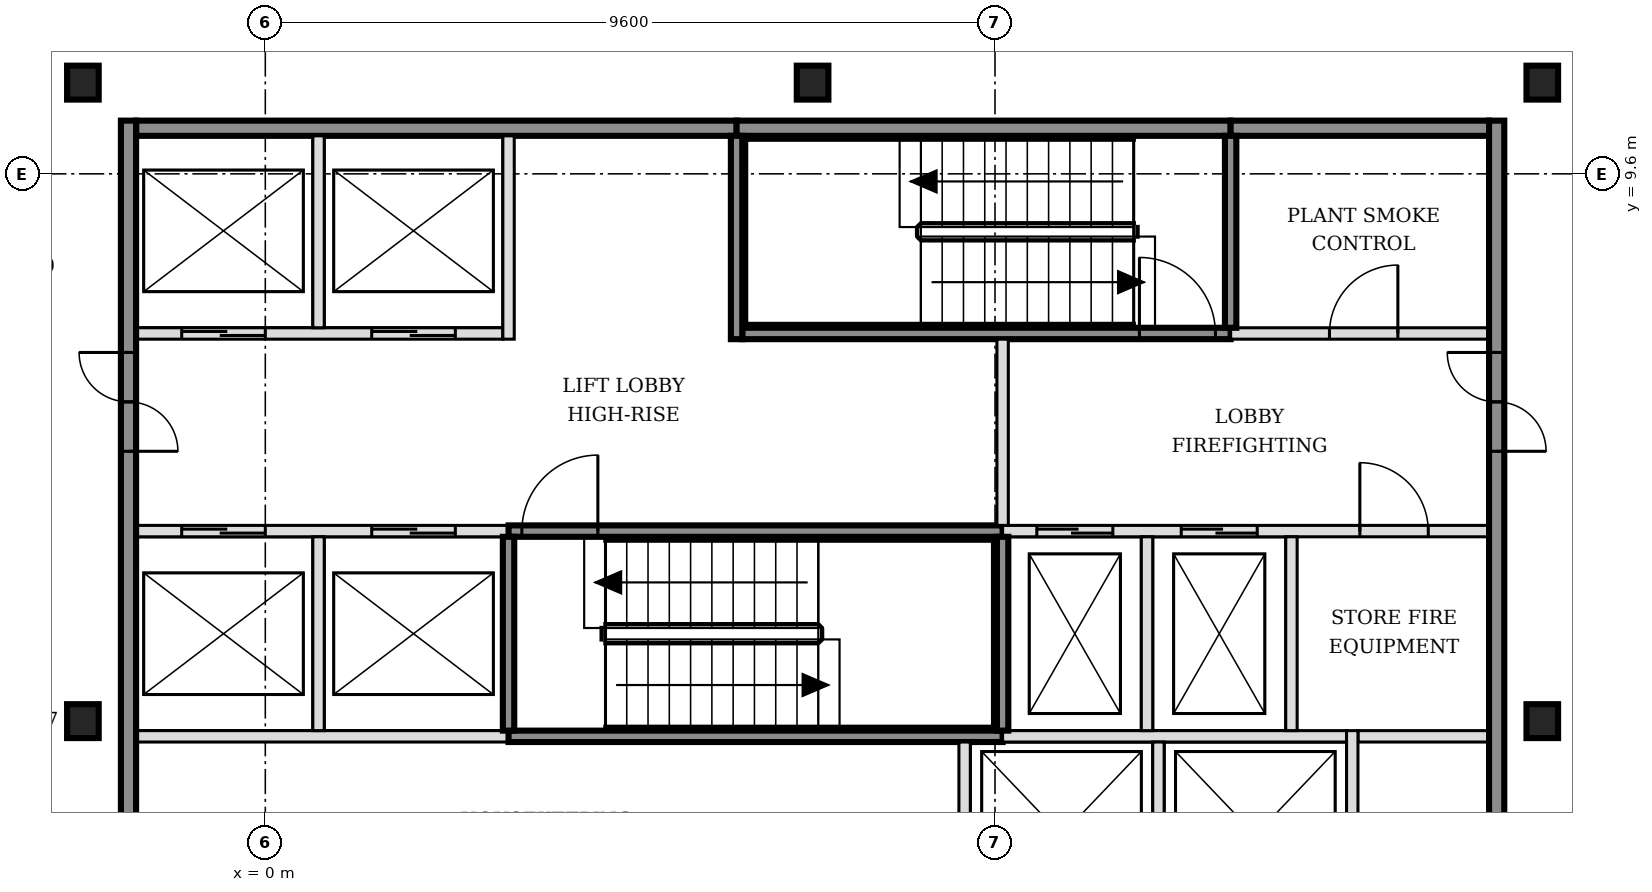
"""IFC4 building model, lengths in metres.
Left out: names, types, materials, properties, quantities, classifications, styles, units other than length and angle.
Written with IfcOpenShell. Run it as: python <this file> out.ifc"""

import sys

from ifc_helpers import new_model, si_unit, direction, frame, frame_2d, origin, origin_2d, place, context, subcontext, project, spatial, rectangle, i_section, extrude, element, fill, save


model = new_model("IFC4")
c1 = context("Model", 3, precision=1e-05, world=origin(), true_north=direction((0.0, 1.0)))
c2 = subcontext(c1, "Body", "Model", "MODEL_VIEW")
j1 = project(units=[si_unit("LENGTHUNIT", "METRE"), si_unit("PLANEANGLEUNIT", "RADIAN")], contexts=[c1])
p1 = place(None, origin())
s1 = spatial("IfcSite", under=j1, at=p1, CompositionType="ELEMENT")
p2 = place(p1, origin())
s2 = spatial("IfcBuilding", under=s1, at=p2, CompositionType="ELEMENT")
p3 = place(p2, frame((0.0, 0.0, 161.4)))
s3 = spatial("IfcBuildingStorey", under=s2, at=p3, CompositionType="ELEMENT", Elevation=161.4)
for number, where, z_axis, x_axis in (
    (1, (-2.4, 2.4, -0.15), (0.0, 0.0, 1.0), (1.0, 0.0, 0.0)),
    (2, (16.8, 2.4, -0.15), (0.0, 0.0, 1.0), (1.0, 0.0, 0.0)),
    (3, (-2.4, 10.8, -0.15), (0.0, 0.0, 1.0), (1.0, 0.0, 0.0)),
    (4, (7.2, 10.8, -0.15), (0.0, 0.0, 1.0), (1.0, 0.0, 0.0)),
    (5, (16.8, 10.8, -0.15), (0.0, 0.0, 1.0), (1.0, 0.0, 0.0)),
):
    element("IfcColumn", number, at=place(p3, frame(where, z_axis=z_axis, x_axis=x_axis)), inside=s3, PredefinedType="COLUMN", context=c2, shape_type="SweptSolid", body=[
        extrude(i_section(OverallWidth=0.416, OverallDepth=0.446, WebThickness=0.039, FlangeThickness=0.063, FilletRadius=0.015, at=origin_2d()), origin(), (0.0, 0.0, 1.0), 3.6),
    ])
p4 = place(p3, frame((-1.7, 2.2, 0.0), z_axis=(0.0, 0.0, 1.0), x_axis=(1.0, 0.0, 0.0)))
e6 = element("IfcWall", 6, at=p4, inside=s3, PredefinedType="SOLIDWALL", context=c2, shape_type="SweptSolid", body=[
    extrude(rectangle(XDim=4.9, YDim=0.15, at=frame_2d((2.45, 0.0))), origin(), (0.0, 0.0, 1.0), 3.45),
])
p5 = place(p3, frame((3.2, 2.2, 0.0), z_axis=(0.0, 0.0, 1.0), x_axis=(1.0, 0.0, 0.0)))
e7 = element("IfcWall", 7, at=p5, inside=s3, PredefinedType="SOLIDWALL", context=c2, shape_type="SweptSolid", body=[
    extrude(rectangle(XDim=6.5, YDim=0.15, at=frame_2d((3.25, 0.0))), origin(), (0.0, 0.0, 1.0), 3.45),
])
p6 = place(p3, frame((9.7, 2.2, 0.0), z_axis=(0.0, 0.0, 1.0), x_axis=(1.0, 0.0, 0.0)))
e8 = element("IfcWall", 8, at=p6, inside=s3, PredefinedType="SOLIDWALL", context=c2, shape_type="SweptSolid", body=[
    extrude(rectangle(XDim=4.525, YDim=0.15, at=frame_2d((2.263, 0.0))), origin(), (0.0, 0.0, 1.0), 3.45),
])
p7 = place(p3, frame((14.375, 2.2, 0.0), z_axis=(0.0, 0.0, 1.0), x_axis=(1.0, 0.0, 0.0)))
e9 = element("IfcWall", 9, at=p7, inside=s3, PredefinedType="PARTITIONING", context=c2, shape_type="SweptSolid", body=[
    extrude(rectangle(XDim=1.725, YDim=0.15, at=frame_2d((0.863, 0.0))), origin(), (0.0, 0.0, 1.0), 3.45),
])
p8 = place(p3, frame((-1.7, 4.9, 0.0), z_axis=(0.0, 0.0, 1.0), x_axis=(1.0, 0.0, 0.0)))
e10 = element("IfcWall", 10, at=p8, inside=s3, PredefinedType="SOLIDWALL", context=c2, shape_type="SweptSolid", body=[
    extrude(rectangle(XDim=4.9, YDim=0.15, at=frame_2d((2.45, 0.0))), origin(), (0.0, 0.0, 1.0), 3.45),
])
p9 = place(p8, frame((0.6, 0.0, 0.0)))
e11 = element("IfcOpeningElement", 11, at=p9, cuts=e10, PredefinedType="OPENING", context=c2, shape_type="SweptSolid", body=[
    extrude(rectangle(XDim=1.1, YDim=2.1, at=frame_2d((0.55, 1.05))), frame((0.0, 0.085, 0.0), z_axis=(0.0, -1.0, 0.0), x_axis=(1.0, 0.0, 0.0)), (0.0, 0.0, 1.0), 0.17),
])
p10 = place(p8, frame((3.1, 0.0, 0.0)))
e12 = element("IfcOpeningElement", 12, at=p10, cuts=e10, PredefinedType="OPENING", context=c2, shape_type="SweptSolid", body=[
    extrude(rectangle(XDim=1.1, YDim=2.1, at=frame_2d((0.55, 1.05))), frame((0.0, 0.085, 0.0), z_axis=(0.0, -1.0, 0.0), x_axis=(1.0, 0.0, 0.0)), (0.0, 0.0, 1.0), 0.17),
])
p11 = place(p3, frame((3.2, 4.9, 0.0), z_axis=(0.0, 0.0, 1.0), x_axis=(1.0, 0.0, 0.0)))
e13 = element("IfcWall", 13, at=p11, inside=s3, PredefinedType="SOLIDWALL", context=c2, shape_type="SweptSolid", body=[
    extrude(rectangle(XDim=6.5, YDim=0.15, at=frame_2d((3.25, 0.0))), origin(), (0.0, 0.0, 1.0), 3.45),
])
p12 = place(p11, frame((0.175, 0.0, 0.0)))
e14 = element("IfcOpeningElement", 14, at=p12, cuts=e13, PredefinedType="OPENING", context=c2, shape_type="SweptSolid", body=[
    extrude(rectangle(XDim=1.0, YDim=2.1, at=frame_2d((0.5, 1.05))), frame((0.0, 0.085, 0.0), z_axis=(0.0, -1.0, 0.0), x_axis=(1.0, 0.0, 0.0)), (0.0, 0.0, 1.0), 0.17),
])
p13 = place(p3, frame((9.7, 4.9, 0.0), z_axis=(0.0, 0.0, 1.0), x_axis=(1.0, 0.0, 0.0)))
e15 = element("IfcWall", 15, at=p13, inside=s3, PredefinedType="SOLIDWALL", context=c2, shape_type="SweptSolid", body=[
    extrude(rectangle(XDim=6.4, YDim=0.15, at=frame_2d((3.2, 0.0))), origin(), (0.0, 0.0, 1.0), 3.45),
])
p14 = place(p13, frame((0.45, 0.0, 0.0)))
e16 = element("IfcOpeningElement", 16, at=p14, cuts=e15, PredefinedType="OPENING", context=c2, shape_type="SweptSolid", body=[
    extrude(rectangle(XDim=1.0, YDim=2.1, at=frame_2d((0.5, 1.05))), frame((0.0, 0.085, 0.0), z_axis=(0.0, -1.0, 0.0), x_axis=(1.0, 0.0, 0.0)), (0.0, 0.0, 1.0), 0.17),
])
p15 = place(p13, frame((2.35, 0.0, 0.0)))
e17 = element("IfcOpeningElement", 17, at=p15, cuts=e15, PredefinedType="OPENING", context=c2, shape_type="SweptSolid", body=[
    extrude(rectangle(XDim=1.0, YDim=2.1, at=frame_2d((0.5, 1.05))), frame((0.0, 0.085, 0.0), z_axis=(0.0, -1.0, 0.0), x_axis=(1.0, 0.0, 0.0)), (0.0, 0.0, 1.0), 0.17),
])
p16 = place(p13, frame((4.7, 0.0, 0.0)))
e18 = element("IfcOpeningElement", 18, at=p16, cuts=e15, PredefinedType="OPENING", context=c2, shape_type="SweptSolid", body=[
    extrude(rectangle(XDim=0.9, YDim=2.1, at=frame_2d((0.45, 1.05))), frame((0.0, 0.085, 0.0), z_axis=(0.0, -1.0, 0.0), x_axis=(1.0, 0.0, 0.0)), (0.0, 0.0, 1.0), 0.17),
])
p17 = place(p3, frame((-1.7, 7.5, 0.0), z_axis=(0.0, 0.0, 1.0), x_axis=(1.0, 0.0, 0.0)))
e19 = element("IfcWall", 19, at=p17, inside=s3, PredefinedType="SOLIDWALL", context=c2, shape_type="SweptSolid", body=[
    extrude(rectangle(XDim=4.825, YDim=0.15, at=frame_2d((2.413, 0.0))), origin(), (0.0, 0.0, 1.0), 3.45),
])
p18 = place(p17, frame((0.6, 0.0, 0.0)))
e20 = element("IfcOpeningElement", 20, at=p18, cuts=e19, PredefinedType="OPENING", context=c2, shape_type="SweptSolid", body=[
    extrude(rectangle(XDim=1.1, YDim=2.1, at=frame_2d((0.55, 1.05))), frame((0.0, 0.085, 0.0), z_axis=(0.0, -1.0, 0.0), x_axis=(1.0, 0.0, 0.0)), (0.0, 0.0, 1.0), 0.17),
])
p19 = place(p17, frame((3.1, 0.0, 0.0)))
e21 = element("IfcOpeningElement", 21, at=p19, cuts=e19, PredefinedType="OPENING", context=c2, shape_type="SweptSolid", body=[
    extrude(rectangle(XDim=1.1, YDim=2.1, at=frame_2d((0.55, 1.05))), frame((0.0, 0.085, 0.0), z_axis=(0.0, -1.0, 0.0), x_axis=(1.0, 0.0, 0.0)), (0.0, 0.0, 1.0), 0.17),
])
p20 = place(p3, frame((6.275, 7.5, 0.0), z_axis=(0.0, 0.0, 1.0), x_axis=(1.0, 0.0, 0.0)))
e22 = element("IfcWall", 22, at=p20, inside=s3, PredefinedType="SOLIDWALL", context=c2, shape_type="SweptSolid", body=[
    extrude(rectangle(XDim=6.425, YDim=0.15, at=frame_2d((3.212, 0.0))), origin(), (0.0, 0.0, 1.0), 3.45),
])
p21 = place(p20, frame((5.225, 0.0, 0.0)))
e23 = element("IfcOpeningElement", 23, at=p21, cuts=e22, PredefinedType="OPENING", context=c2, shape_type="SweptSolid", body=[
    extrude(rectangle(XDim=1.0, YDim=2.1, at=frame_2d((0.5, 1.05))), frame((0.0, 0.085, 0.0), z_axis=(0.0, -1.0, 0.0), x_axis=(1.0, 0.0, 0.0)), (0.0, 0.0, 1.0), 0.17),
])
p22 = place(p3, frame((12.7, 7.5, 0.0), z_axis=(0.0, 0.0, 1.0), x_axis=(1.0, 0.0, 0.0)))
e24 = element("IfcWall", 24, at=p22, inside=s3, PredefinedType="SOLIDWALL", context=c2, shape_type="SweptSolid", body=[
    extrude(rectangle(XDim=3.4, YDim=0.15, at=frame_2d((1.7, 0.0))), origin(), (0.0, 0.0, 1.0), 3.45),
])
p23 = place(p22, frame((1.3, 0.0, 0.0)))
e25 = element("IfcOpeningElement", 25, at=p23, cuts=e24, PredefinedType="OPENING", context=c2, shape_type="SweptSolid", body=[
    extrude(rectangle(XDim=0.9, YDim=2.1, at=frame_2d((0.45, 1.05))), frame((0.0, 0.085, 0.0), z_axis=(0.0, -1.0, 0.0), x_axis=(1.0, 0.0, 0.0)), (0.0, 0.0, 1.0), 0.17),
])
p24 = place(p3, frame((-1.7, 10.2, 0.0), z_axis=(0.0, 0.0, 1.0), x_axis=(1.0, 0.0, 0.0)))
e26 = element("IfcWall", 26, at=p24, inside=s3, PredefinedType="SOLIDWALL", context=c2, shape_type="SweptSolid", body=[
    extrude(rectangle(XDim=7.9, YDim=0.2, at=frame_2d((3.95, 0.0))), origin(), (0.0, 0.0, 1.0), 3.45),
])
p25 = place(p3, frame((6.2, 10.2, 0.0), z_axis=(0.0, 0.0, 1.0), x_axis=(1.0, 0.0, 0.0)))
e27 = element("IfcWall", 27, at=p25, inside=s3, PredefinedType="SOLIDWALL", context=c2, shape_type="SweptSolid", body=[
    extrude(rectangle(XDim=6.5, YDim=0.2, at=frame_2d((3.25, 0.0))), origin(), (0.0, 0.0, 1.0), 3.45),
])
p26 = place(p3, frame((12.7, 10.2, 0.0), z_axis=(0.0, 0.0, 1.0), x_axis=(1.0, 0.0, 0.0)))
e28 = element("IfcWall", 28, at=p26, inside=s3, PredefinedType="SOLIDWALL", context=c2, shape_type="SweptSolid", body=[
    extrude(rectangle(XDim=3.4, YDim=0.2, at=frame_2d((1.7, 0.0))), origin(), (0.0, 0.0, 1.0), 3.45),
])
p27 = place(p3, frame((-1.8, -5.5, 0.0), z_axis=(0.0, 0.0, 1.0), x_axis=(0.0, 1.0, 0.0)))
e29 = element("IfcWall", 29, at=p27, inside=s3, PredefinedType="SOLIDWALL", context=c2, shape_type="SweptSolid", body=[
    extrude(rectangle(XDim=15.8, YDim=0.2, at=frame_2d((7.9, 0.0))), origin(), (0.0, 0.0, 1.0), 3.45),
])
p28 = place(p27, frame((3.05, 0.0, 0.0)))
e30 = element("IfcOpeningElement", 30, at=p28, cuts=e29, PredefinedType="OPENING", context=c2, shape_type="SweptSolid", body=[
    extrude(rectangle(XDim=1.3, YDim=2.1, at=frame_2d((0.65, 1.05))), frame((0.0, 0.11, 0.0), z_axis=(0.0, -1.0, 0.0), x_axis=(1.0, 0.0, 0.0)), (0.0, 0.0, 1.0), 0.22),
])
p29 = place(p27, frame((11.45, 0.0, 0.0)))
e31 = element("IfcOpeningElement", 31, at=p29, cuts=e29, PredefinedType="OPENING", context=c2, shape_type="SweptSolid", body=[
    extrude(rectangle(XDim=1.3, YDim=2.1, at=frame_2d((0.65, 1.05))), frame((0.0, 0.11, 0.0), z_axis=(0.0, -1.0, 0.0), x_axis=(1.0, 0.0, 0.0)), (0.0, 0.0, 1.0), 0.22),
])
p30 = place(p3, frame((0.7, 2.275, 0.0), z_axis=(0.0, 0.0, 1.0), x_axis=(0.0, 1.0, 0.0)))
e32 = element("IfcWall", 32, at=p30, inside=s3, PredefinedType="SOLIDWALL", context=c2, shape_type="SweptSolid", body=[
    extrude(rectangle(XDim=2.55, YDim=0.15, at=frame_2d((1.275, 0.0))), origin(), (0.0, 0.0, 1.0), 3.45),
])
p31 = place(p3, frame((0.7, 7.575, 0.0), z_axis=(0.0, 0.0, 1.0), x_axis=(0.0, 1.0, 0.0)))
e33 = element("IfcWall", 33, at=p31, inside=s3, PredefinedType="SOLIDWALL", context=c2, shape_type="SweptSolid", body=[
    extrude(rectangle(XDim=2.525, YDim=0.15, at=frame_2d((1.263, 0.0))), origin(), (0.0, 0.0, 1.0), 3.45),
])
p32 = place(p3, frame((3.2, 2.275, 0.0), z_axis=(0.0, 0.0, 1.0), x_axis=(0.0, 1.0, 0.0)))
e34 = element("IfcWall", 34, at=p32, inside=s3, PredefinedType="SOLIDWALL", context=c2, shape_type="SweptSolid", body=[
    extrude(rectangle(XDim=2.55, YDim=0.15, at=frame_2d((1.275, 0.0))), origin(), (0.0, 0.0, 1.0), 3.45),
])
for number, where, z_axis, x_axis in (
    (35, (3.2, 7.425, 0.0), (0.0, 0.0, 1.0), (0.0, 1.0, 0.0)),
    (36, (6.2, 7.425, 0.0), (0.0, 0.0, 1.0), (0.0, 1.0, 0.0)),
):
    element("IfcWall", number, at=place(p3, frame(where, z_axis=z_axis, x_axis=x_axis)), inside=s3, PredefinedType="SOLIDWALL", context=c2, shape_type="SweptSolid", body=[
        extrude(rectangle(XDim=2.675, YDim=0.15, at=frame_2d((1.337, 0.0))), origin(), (0.0, 0.0, 1.0), 3.45),
    ])
p33 = place(p3, frame((9.2, -0.475, 0.0), z_axis=(0.0, 0.0, 1.0), x_axis=(0.0, 1.0, 0.0)))
e37 = element("IfcWall", 37, at=p33, inside=s3, PredefinedType="SOLIDWALL", context=c2, shape_type="SweptSolid", body=[
    extrude(rectangle(XDim=2.6, YDim=0.15, at=frame_2d((1.3, 0.0))), origin(), (0.0, 0.0, 1.0), 3.45),
])
p34 = place(p3, frame((9.7, 2.275, 0.0), z_axis=(0.0, 0.0, 1.0), x_axis=(0.0, 1.0, 0.0)))
e38 = element("IfcWall", 38, at=p34, inside=s3, PredefinedType="SOLIDWALL", context=c2, shape_type="SweptSolid", body=[
    extrude(rectangle(XDim=2.55, YDim=0.15, at=frame_2d((1.275, 0.0))), origin(), (0.0, 0.0, 1.0), 3.45),
])
p35 = place(p3, frame((9.7, 4.975, 0.0), z_axis=(0.0, 0.0, 1.0), x_axis=(0.0, 1.0, 0.0)))
e39 = element("IfcWall", 39, at=p35, inside=s3, PredefinedType="SOLIDWALL", context=c2, shape_type="SweptSolid", body=[
    extrude(rectangle(XDim=2.45, YDim=0.15, at=frame_2d((1.225, 0.0))), origin(), (0.0, 0.0, 1.0), 3.45),
])
p36 = place(p3, frame((11.6, 2.275, 0.0), z_axis=(0.0, 0.0, 1.0), x_axis=(0.0, 1.0, 0.0)))
e40 = element("IfcWall", 40, at=p36, inside=s3, PredefinedType="SOLIDWALL", context=c2, shape_type="SweptSolid", body=[
    extrude(rectangle(XDim=2.55, YDim=0.15, at=frame_2d((1.275, 0.0))), origin(), (0.0, 0.0, 1.0), 3.45),
])
p37 = place(p3, frame((11.75, -0.325, 0.0), z_axis=(0.0, 0.0, 1.0), x_axis=(0.0, 1.0, 0.0)))
e41 = element("IfcWall", 41, at=p37, inside=s3, PredefinedType="SOLIDWALL", context=c2, shape_type="SweptSolid", body=[
    extrude(rectangle(XDim=2.45, YDim=0.15, at=frame_2d((1.225, 0.0))), origin(), (0.0, 0.0, 1.0), 3.45),
])
p38 = place(p3, frame((12.7, 7.575, 0.0), z_axis=(0.0, 0.0, 1.0), x_axis=(0.0, 1.0, 0.0)))
e42 = element("IfcWall", 42, at=p38, inside=s3, PredefinedType="SOLIDWALL", context=c2, shape_type="SweptSolid", body=[
    extrude(rectangle(XDim=2.525, YDim=0.15, at=frame_2d((1.263, 0.0))), origin(), (0.0, 0.0, 1.0), 3.45),
])
p39 = place(p3, frame((13.5, 2.275, 0.0), z_axis=(0.0, 0.0, 1.0), x_axis=(0.0, 1.0, 0.0)))
e43 = element("IfcWall", 43, at=p39, inside=s3, PredefinedType="SOLIDWALL", context=c2, shape_type="SweptSolid", body=[
    extrude(rectangle(XDim=2.55, YDim=0.15, at=frame_2d((1.275, 0.0))), origin(), (0.0, 0.0, 1.0), 3.45),
])
p40 = place(p3, frame((14.3, -0.475, 0.0), z_axis=(0.0, 0.0, 1.0), x_axis=(0.0, 1.0, 0.0)))
e44 = element("IfcWall", 44, at=p40, inside=s3, PredefinedType="SOLIDWALL", context=c2, shape_type="SweptSolid", body=[
    extrude(rectangle(XDim=2.75, YDim=0.15, at=frame_2d((1.375, 0.0))), origin(), (0.0, 0.0, 1.0), 3.45),
])
p41 = place(p3, frame((16.2, -5.5, 0.0), z_axis=(0.0, 0.0, 1.0), x_axis=(0.0, 1.0, 0.0)))
e45 = element("IfcWall", 45, at=p41, inside=s3, PredefinedType="SOLIDWALL", context=c2, shape_type="SweptSolid", body=[
    extrude(rectangle(XDim=15.8, YDim=0.2, at=frame_2d((7.9, 0.0))), origin(), (0.0, 0.0, 1.0), 3.45),
])
p42 = place(p41, frame((3.05, 0.0, 0.0)))
e46 = element("IfcOpeningElement", 46, at=p42, cuts=e45, PredefinedType="OPENING", context=c2, shape_type="SweptSolid", body=[
    extrude(rectangle(XDim=1.3, YDim=2.1, at=frame_2d((0.65, 1.05))), frame((0.0, 0.11, 0.0), z_axis=(0.0, -1.0, 0.0), x_axis=(1.0, 0.0, 0.0)), (0.0, 0.0, 1.0), 0.22),
])
p43 = place(p41, frame((11.45, 0.0, 0.0)))
e47 = element("IfcOpeningElement", 47, at=p43, cuts=e45, PredefinedType="OPENING", context=c2, shape_type="SweptSolid", body=[
    extrude(rectangle(XDim=1.3, YDim=2.1, at=frame_2d((0.65, 1.05))), frame((0.0, 0.11, 0.0), z_axis=(0.0, -1.0, 0.0), x_axis=(1.0, 0.0, 0.0)), (0.0, 0.0, 1.0), 0.22),
])
p44 = place(p9, origin())
e48 = element("IfcDoor", 48, at=p44, inside=s3, OperationType="DOUBLE_DOOR_SLIDING", PredefinedType="DOOR", context=c2, shape_type="SweptSolid", body=[
    extrude(rectangle(XDim=1.1, YDim=2.1, at=frame_2d((0.55, 1.05))), frame((0.0, 0.025, 0.0), z_axis=(0.0, -1.0, 0.0), x_axis=(1.0, 0.0, 0.0)), (0.0, 0.0, 1.0), 0.05),
])
fill(e11, e48)
p45 = place(p10, origin())
e49 = element("IfcDoor", 49, at=p45, inside=s3, OperationType="DOUBLE_DOOR_SLIDING", PredefinedType="DOOR", context=c2, shape_type="SweptSolid", body=[
    extrude(rectangle(XDim=1.1, YDim=2.1, at=frame_2d((0.55, 1.05))), frame((0.0, 0.025, 0.0), z_axis=(0.0, -1.0, 0.0), x_axis=(1.0, 0.0, 0.0)), (0.0, 0.0, 1.0), 0.05),
])
fill(e12, e49)
p46 = place(p18, origin())
e50 = element("IfcDoor", 50, at=p46, inside=s3, OperationType="DOUBLE_DOOR_SLIDING", PredefinedType="DOOR", context=c2, shape_type="SweptSolid", body=[
    extrude(rectangle(XDim=1.1, YDim=2.1, at=frame_2d((0.55, 1.05))), frame((0.0, 0.025, 0.0), z_axis=(0.0, -1.0, 0.0), x_axis=(1.0, 0.0, 0.0)), (0.0, 0.0, 1.0), 0.05),
])
fill(e20, e50)
p47 = place(p19, origin())
e51 = element("IfcDoor", 51, at=p47, inside=s3, OperationType="DOUBLE_DOOR_SLIDING", PredefinedType="DOOR", context=c2, shape_type="SweptSolid", body=[
    extrude(rectangle(XDim=1.1, YDim=2.1, at=frame_2d((0.55, 1.05))), frame((0.0, 0.025, 0.0), z_axis=(0.0, -1.0, 0.0), x_axis=(1.0, 0.0, 0.0)), (0.0, 0.0, 1.0), 0.05),
])
fill(e21, e51)
p48 = place(p14, origin())
e52 = element("IfcDoor", 52, at=p48, inside=s3, OperationType="DOUBLE_DOOR_SLIDING", PredefinedType="DOOR", context=c2, shape_type="SweptSolid", body=[
    extrude(rectangle(XDim=1.0, YDim=2.1, at=frame_2d((0.5, 1.05))), frame((0.0, 0.025, 0.0), z_axis=(0.0, -1.0, 0.0), x_axis=(1.0, 0.0, 0.0)), (0.0, 0.0, 1.0), 0.05),
])
fill(e16, e52)
p49 = place(p15, origin())
e53 = element("IfcDoor", 53, at=p49, inside=s3, OperationType="DOUBLE_DOOR_SLIDING", PredefinedType="DOOR", context=c2, shape_type="SweptSolid", body=[
    extrude(rectangle(XDim=1.0, YDim=2.1, at=frame_2d((0.5, 1.05))), frame((0.0, 0.025, 0.0), z_axis=(0.0, -1.0, 0.0), x_axis=(1.0, 0.0, 0.0)), (0.0, 0.0, 1.0), 0.05),
])
fill(e17, e53)
p50 = place(p12, origin())
e54 = element("IfcDoor", 54, at=p50, inside=s3, OperationType="SINGLE_SWING_RIGHT", PredefinedType="DOOR", context=c2, shape_type="SweptSolid", body=[
    extrude(rectangle(XDim=1.0, YDim=2.1, at=frame_2d((0.5, 1.05))), frame((0.0, 0.025, 0.0), z_axis=(0.0, -1.0, 0.0), x_axis=(1.0, 0.0, 0.0)), (0.0, 0.0, 1.0), 0.05),
])
fill(e14, e54)
p51 = place(p21, origin())
e55 = element("IfcDoor", 55, at=p51, inside=s3, OperationType="SINGLE_SWING_LEFT", PredefinedType="DOOR", context=c2, shape_type="SweptSolid", body=[
    extrude(rectangle(XDim=1.0, YDim=2.1, at=frame_2d((0.5, 1.05))), frame((0.0, 0.025, 0.0), z_axis=(0.0, -1.0, 0.0), x_axis=(1.0, 0.0, 0.0)), (0.0, 0.0, 1.0), 0.05),
])
fill(e23, e55)
p52 = place(p29, origin())
e56 = element("IfcDoor", 56, at=p52, inside=s3, OperationType="DOUBLE_DOOR_SINGLE_SWING", PredefinedType="DOOR", context=c2, shape_type="SweptSolid", body=[
    extrude(rectangle(XDim=1.3, YDim=2.1, at=frame_2d((0.65, 1.05))), frame((0.0, 0.025, 0.0), z_axis=(0.0, -1.0, 0.0), x_axis=(1.0, 0.0, 0.0)), (0.0, 0.0, 1.0), 0.05),
])
fill(e31, e56)
p53 = place(p43, origin())
e57 = element("IfcDoor", 57, at=p53, inside=s3, OperationType="DOUBLE_DOOR_SINGLE_SWING", PredefinedType="DOOR", context=c2, shape_type="SweptSolid", body=[
    extrude(rectangle(XDim=1.3, YDim=2.1, at=frame_2d((0.65, 1.05))), frame((0.0, 0.025, 0.0), z_axis=(0.0, -1.0, 0.0), x_axis=(1.0, 0.0, 0.0)), (0.0, 0.0, 1.0), 0.05),
])
fill(e47, e57)
p54 = place(p16, origin())
e58 = element("IfcDoor", 58, at=p54, inside=s3, OperationType="SINGLE_SWING_LEFT", PredefinedType="DOOR", context=c2, shape_type="SweptSolid", body=[
    extrude(rectangle(XDim=0.9, YDim=2.1, at=frame_2d((0.45, 1.05))), frame((0.0, 0.025, 0.0), z_axis=(0.0, -1.0, 0.0), x_axis=(1.0, 0.0, 0.0)), (0.0, 0.0, 1.0), 0.05),
])
fill(e18, e58)
p55 = place(p23, origin())
e59 = element("IfcDoor", 59, at=p55, inside=s3, OperationType="SINGLE_SWING_RIGHT", PredefinedType="DOOR", context=c2, shape_type="SweptSolid", body=[
    extrude(rectangle(XDim=0.9, YDim=2.1, at=frame_2d((0.45, 1.05))), frame((0.0, 0.025, 0.0), z_axis=(0.0, -1.0, 0.0), x_axis=(1.0, 0.0, 0.0)), (0.0, 0.0, 1.0), 0.05),
])
fill(e25, e59)
save(model, sys.argv[1])
